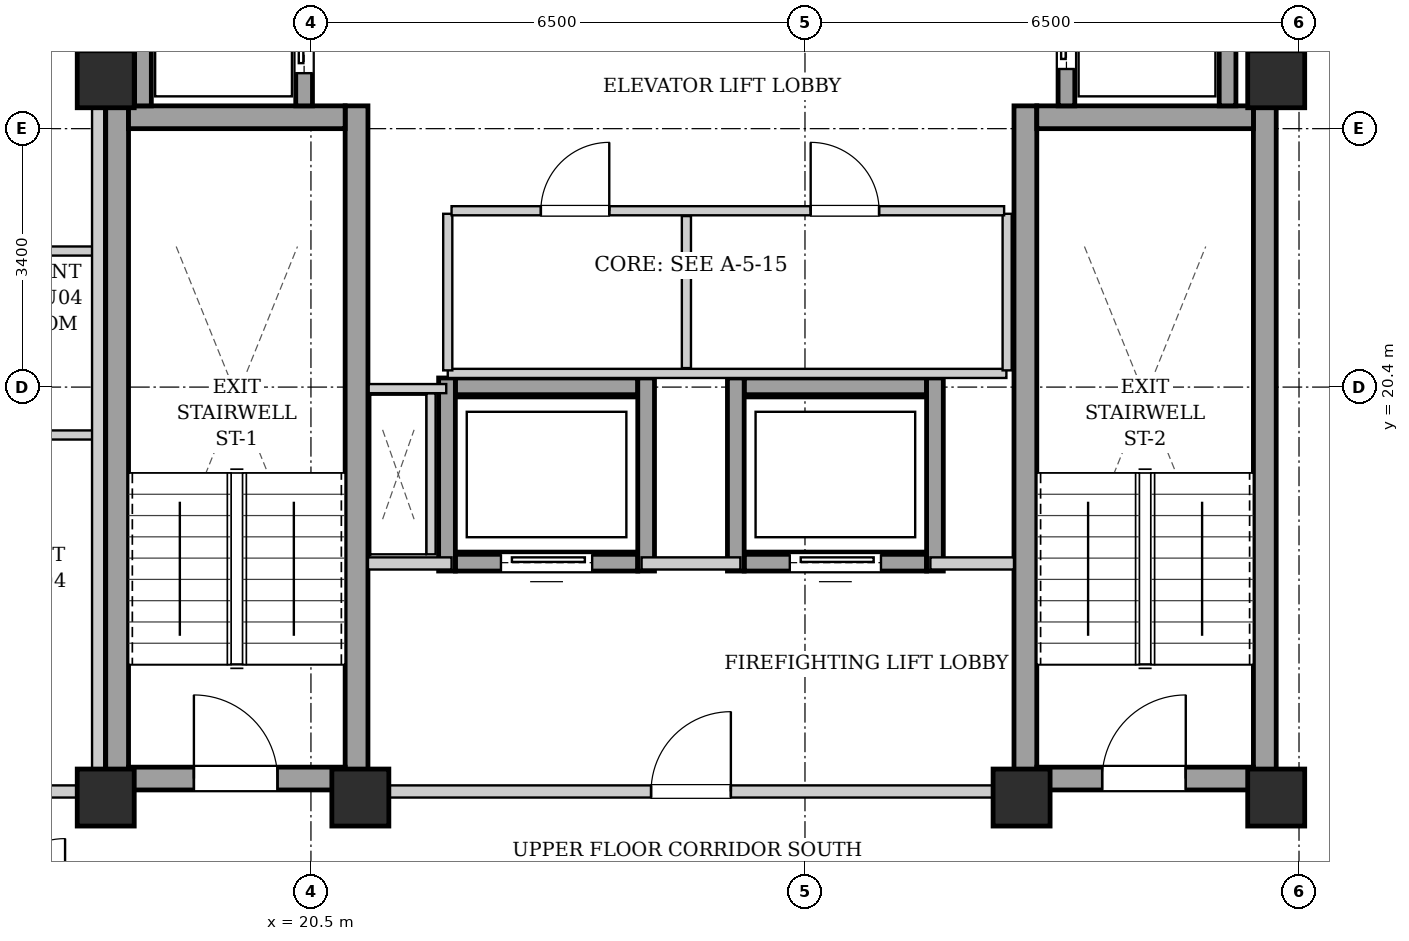
"""IFC4 building model, lengths in metres.
Left out: names, types, materials, properties, quantities, classifications, styles, units other than length and angle.
Written with IfcOpenShell. Run it as: python <this file> out.ifc"""

import sys

from ifc_helpers import new_model, si_unit, direction, frame, frame_2d, origin, origin_2d, place, context, subcontext, project, spatial, rectangle, extrude, element, fill, save


model = new_model("IFC4")
c1 = context("Model", 3, precision=1e-05, world=origin(), true_north=direction((0.0, 1.0)))
c2 = subcontext(c1, "Body", "Model", "MODEL_VIEW")
j1 = project(units=[si_unit("LENGTHUNIT", "METRE"), si_unit("PLANEANGLEUNIT", "RADIAN")], contexts=[c1])
p1 = place(None, origin())
s1 = spatial("IfcSite", under=j1, at=p1, CompositionType="ELEMENT")
p2 = place(p1, origin())
s2 = spatial("IfcBuilding", under=s1, at=p2, CompositionType="ELEMENT")
p3 = place(p2, frame((0.0, 0.0, 230.9)))
s3 = spatial("IfcBuildingStorey", under=s2, at=p3, CompositionType="ELEMENT", Elevation=230.9)
for number, where, z_axis, x_axis in (
    (1, (17.8, 15.0, 0.0), (0.0, 0.0, 1.0), (1.0, 0.0, 0.0)),
    (2, (21.15, 15.0, 0.0), (0.0, 0.0, 1.0), (1.0, 0.0, 0.0)),
    (3, (29.85, 15.0, 0.0), (0.0, 0.0, 1.0), (1.0, 0.0, 0.0)),
    (4, (33.2, 15.0, 0.0), (0.0, 0.0, 1.0), (1.0, 0.0, 0.0)),
    (5, (17.8, 24.45, 0.0), (0.0, 0.0, 1.0), (1.0, 0.0, 0.0)),
    (6, (33.2, 24.45, 0.0), (0.0, 0.0, 1.0), (1.0, 0.0, 0.0)),
):
    element("IfcColumn", number, at=place(p3, frame(where, z_axis=z_axis, x_axis=x_axis)), inside=s3, PredefinedType="COLUMN", context=c2, shape_type="SweptSolid", body=[
        extrude(rectangle(XDim=0.75, YDim=0.75, at=origin_2d()), origin(), (0.0, 0.0, 1.0), 3.4),
    ])
for number, where, z_axis, x_axis in (
    (7, (17.95, 15.1, 0.0), (0.0, 0.0, 1.0), (0.0, 1.0, 0.0)),
    (8, (21.1, 15.1, 0.0), (0.0, 0.0, 1.0), (0.0, 1.0, 0.0)),
):
    element("IfcWall", number, at=place(p3, frame(where, z_axis=z_axis, x_axis=x_axis)), inside=s3, PredefinedType="SHEAR", context=c2, shape_type="SweptSolid", body=[
        extrude(rectangle(XDim=9.0, YDim=0.3, at=frame_2d((4.5, 0.0))), origin(), (0.0, 0.0, 1.0), 3.14),
    ])
p4 = place(p3, frame((18.1, 23.95, 0.0), z_axis=(0.0, 0.0, 1.0), x_axis=(1.0, 0.0, 0.0)))
e9 = element("IfcWall", 9, at=p4, inside=s3, PredefinedType="SHEAR", context=c2, shape_type="SweptSolid", body=[
    extrude(rectangle(XDim=2.85, YDim=0.3, at=frame_2d((1.425, 0.0))), origin(), (0.0, 0.0, 1.0), 3.14),
])
p5 = place(p3, frame((18.1, 15.25, 0.0), z_axis=(0.0, 0.0, 1.0), x_axis=(1.0, 0.0, 0.0)))
e10 = element("IfcWall", 10, at=p5, inside=s3, PredefinedType="SHEAR", context=c2, shape_type="SweptSolid", body=[
    extrude(rectangle(XDim=2.85, YDim=0.3, at=frame_2d((1.425, 0.0))), origin(), (0.0, 0.0, 1.0), 3.14),
])
p6 = place(p5, frame((0.86, 0.0, 0.0)))
e11 = element("IfcOpeningElement", 11, at=p6, cuts=e10, PredefinedType="OPENING", context=c2, shape_type="SweptSolid", body=[
    extrude(rectangle(XDim=1.1, YDim=2.05, at=frame_2d((0.55, 1.025))), frame((0.0, 0.16, 0.0), z_axis=(0.0, -1.0, 0.0), x_axis=(1.0, 0.0, 0.0)), (0.0, 0.0, 1.0), 0.32),
])
for number, where, z_axis, x_axis in (
    (12, (29.9, 15.1, 0.0), (0.0, 0.0, 1.0), (0.0, 1.0, 0.0)),
    (13, (33.05, 15.1, 0.0), (0.0, 0.0, 1.0), (0.0, 1.0, 0.0)),
):
    element("IfcWall", number, at=place(p3, frame(where, z_axis=z_axis, x_axis=x_axis)), inside=s3, PredefinedType="SHEAR", context=c2, shape_type="SweptSolid", body=[
        extrude(rectangle(XDim=9.0, YDim=0.3, at=frame_2d((4.5, 0.0))), origin(), (0.0, 0.0, 1.0), 3.14),
    ])
p7 = place(p3, frame((30.05, 23.95, 0.0), z_axis=(0.0, 0.0, 1.0), x_axis=(1.0, 0.0, 0.0)))
e14 = element("IfcWall", 14, at=p7, inside=s3, PredefinedType="SHEAR", context=c2, shape_type="SweptSolid", body=[
    extrude(rectangle(XDim=2.85, YDim=0.3, at=frame_2d((1.425, 0.0))), origin(), (0.0, 0.0, 1.0), 3.14),
])
p8 = place(p3, frame((30.05, 15.25, 0.0), z_axis=(0.0, 0.0, 1.0), x_axis=(1.0, 0.0, 0.0)))
e15 = element("IfcWall", 15, at=p8, inside=s3, PredefinedType="SHEAR", context=c2, shape_type="SweptSolid", body=[
    extrude(rectangle(XDim=2.85, YDim=0.3, at=frame_2d((1.425, 0.0))), origin(), (0.0, 0.0, 1.0), 3.14),
])
p9 = place(p8, frame((0.86, 0.0, 0.0)))
e16 = element("IfcOpeningElement", 16, at=p9, cuts=e15, PredefinedType="OPENING", context=c2, shape_type="SweptSolid", body=[
    extrude(rectangle(XDim=1.1, YDim=2.05, at=frame_2d((0.55, 1.025))), frame((0.0, 0.16, 0.0), z_axis=(0.0, -1.0, 0.0), x_axis=(1.0, 0.0, 0.0)), (0.0, 0.0, 1.0), 0.32),
])
p10 = place(p3, frame((18.29, 24.1, 0.0), z_axis=(0.0, 0.0, 1.0), x_axis=(0.0, 1.0, 0.0)))
e17 = element("IfcWall", 17, at=p10, inside=s3, PredefinedType="SHEAR", context=c2, shape_type="SweptSolid", body=[
    extrude(rectangle(XDim=4.14, YDim=0.22, at=frame_2d((2.07, 0.0))), origin(), (0.0, 0.0, 1.0), 3.14),
])
p11 = place(p3, frame((20.41, 24.1, 0.0), z_axis=(0.0, 0.0, 1.0), x_axis=(0.0, 1.0, 0.0)))
e18 = element("IfcWall", 18, at=p11, inside=s3, PredefinedType="SHEAR", context=c2, shape_type="SweptSolid", body=[
    extrude(rectangle(XDim=1.96, YDim=0.22, at=frame_2d((0.98, 0.0))), origin(), (0.0, 0.0, 1.0), 3.14),
])
p12 = place(p11, frame((0.43, 0.0, 0.0)))
e19 = element("IfcOpeningElement", 19, at=p12, cuts=e18, PredefinedType="OPENING", context=c2, shape_type="SweptSolid", body=[
    extrude(rectangle(XDim=1.1, YDim=2.15, at=frame_2d((0.55, 1.075))), frame((0.0, 0.12, 0.0), z_axis=(0.0, -1.0, 0.0), x_axis=(1.0, 0.0, 0.0)), (0.0, 0.0, 1.0), 0.24),
])
p13 = place(p3, frame((30.44, 24.1, 0.0), z_axis=(0.0, 0.0, 1.0), x_axis=(0.0, 1.0, 0.0)))
e20 = element("IfcWall", 20, at=p13, inside=s3, PredefinedType="SHEAR", context=c2, shape_type="SweptSolid", body=[
    extrude(rectangle(XDim=2.07, YDim=0.22, at=frame_2d((1.035, 0.0))), origin(), (0.0, 0.0, 1.0), 3.14),
])
p14 = place(p13, frame((0.485, 0.0, 0.0)))
e21 = element("IfcOpeningElement", 21, at=p14, cuts=e20, PredefinedType="OPENING", context=c2, shape_type="SweptSolid", body=[
    extrude(rectangle(XDim=1.1, YDim=2.15, at=frame_2d((0.55, 1.075))), frame((0.0, 0.12, 0.0), z_axis=(0.0, -1.0, 0.0), x_axis=(1.0, 0.0, 0.0)), (0.0, 0.0, 1.0), 0.24),
])
p15 = place(p3, frame((32.56, 24.1, 0.0), z_axis=(0.0, 0.0, 1.0), x_axis=(0.0, 1.0, 0.0)))
e22 = element("IfcWall", 22, at=p15, inside=s3, PredefinedType="SHEAR", context=c2, shape_type="SweptSolid", body=[
    extrude(rectangle(XDim=2.07, YDim=0.22, at=frame_2d((1.035, 0.0))), origin(), (0.0, 0.0, 1.0), 3.14),
])
p16 = place(p3, frame((22.4, 18.09, 0.0), z_axis=(0.0, 0.0, 1.0), x_axis=(1.0, 0.0, 0.0)))
e23 = element("IfcWall", 23, at=p16, inside=s3, PredefinedType="SHEAR", context=c2, shape_type="SweptSolid", body=[
    extrude(rectangle(XDim=2.4, YDim=0.22, at=frame_2d((1.2, 0.0))), origin(), (0.0, 0.0, 1.0), 3.14),
])
p17 = place(p16, frame((0.6, 0.0, 0.0)))
e24 = element("IfcOpeningElement", 24, at=p17, cuts=e23, PredefinedType="OPENING", context=c2, shape_type="SweptSolid", body=[
    extrude(rectangle(XDim=1.2, YDim=2.15, at=frame_2d((0.6, 1.075))), frame((0.0, 0.12, 0.0), z_axis=(0.0, -1.0, 0.0), x_axis=(1.0, 0.0, 0.0)), (0.0, 0.0, 1.0), 0.24),
])
p18 = place(p3, frame((22.4, 20.41, 0.0), z_axis=(0.0, 0.0, 1.0), x_axis=(1.0, 0.0, 0.0)))
e25 = element("IfcWall", 25, at=p18, inside=s3, PredefinedType="SHEAR", context=c2, shape_type="SweptSolid", body=[
    extrude(rectangle(XDim=2.4, YDim=0.22, at=frame_2d((1.2, 0.0))), origin(), (0.0, 0.0, 1.0), 3.14),
])
for number, where, z_axis, x_axis in (
    (26, (22.29, 17.98, 0.0), (0.0, 0.0, 1.0), (0.0, 1.0, 0.0)),
    (27, (24.91, 17.98, 0.0), (0.0, 0.0, 1.0), (0.0, 1.0, 0.0)),
):
    element("IfcWall", number, at=place(p3, frame(where, z_axis=z_axis, x_axis=x_axis)), inside=s3, PredefinedType="SHEAR", context=c2, shape_type="SweptSolid", body=[
        extrude(rectangle(XDim=2.54, YDim=0.22, at=frame_2d((1.27, 0.0))), origin(), (0.0, 0.0, 1.0), 3.14),
    ])
p19 = place(p3, frame((26.2, 18.09, 0.0), z_axis=(0.0, 0.0, 1.0), x_axis=(1.0, 0.0, 0.0)))
e28 = element("IfcWall", 28, at=p19, inside=s3, PredefinedType="SHEAR", context=c2, shape_type="SweptSolid", body=[
    extrude(rectangle(XDim=2.4, YDim=0.22, at=frame_2d((1.2, 0.0))), origin(), (0.0, 0.0, 1.0), 3.14),
])
p20 = place(p19, frame((0.6, 0.0, 0.0)))
e29 = element("IfcOpeningElement", 29, at=p20, cuts=e28, PredefinedType="OPENING", context=c2, shape_type="SweptSolid", body=[
    extrude(rectangle(XDim=1.2, YDim=2.15, at=frame_2d((0.6, 1.075))), frame((0.0, 0.12, 0.0), z_axis=(0.0, -1.0, 0.0), x_axis=(1.0, 0.0, 0.0)), (0.0, 0.0, 1.0), 0.24),
])
p21 = place(p3, frame((26.2, 20.41, 0.0), z_axis=(0.0, 0.0, 1.0), x_axis=(1.0, 0.0, 0.0)))
e30 = element("IfcWall", 30, at=p21, inside=s3, PredefinedType="SHEAR", context=c2, shape_type="SweptSolid", body=[
    extrude(rectangle(XDim=2.4, YDim=0.22, at=frame_2d((1.2, 0.0))), origin(), (0.0, 0.0, 1.0), 3.14),
])
for number, where, z_axis, x_axis in (
    (31, (26.09, 17.98, 0.0), (0.0, 0.0, 1.0), (0.0, 1.0, 0.0)),
    (32, (28.71, 17.98, 0.0), (0.0, 0.0, 1.0), (0.0, 1.0, 0.0)),
):
    element("IfcWall", number, at=place(p3, frame(where, z_axis=z_axis, x_axis=x_axis)), inside=s3, PredefinedType="SHEAR", context=c2, shape_type="SweptSolid", body=[
        extrude(rectangle(XDim=2.54, YDim=0.22, at=frame_2d((1.27, 0.0))), origin(), (0.0, 0.0, 1.0), 3.14),
    ])
p22 = place(p3, frame((21.25, 15.08, 0.0), z_axis=(0.0, 0.0, 1.0), x_axis=(1.0, 0.0, 0.0)))
e33 = element("IfcWall", 33, at=p22, inside=s3, PredefinedType="PARTITIONING", context=c2, shape_type="SweptSolid", body=[
    extrude(rectangle(XDim=8.5, YDim=0.16, at=frame_2d((4.25, 0.0))), origin(), (0.0, 0.0, 1.0), 2.668),
])
p23 = place(p22, frame((3.725, 0.0, 0.0)))
e34 = element("IfcOpeningElement", 34, at=p23, cuts=e33, PredefinedType="OPENING", context=c2, shape_type="SweptSolid", body=[
    extrude(rectangle(XDim=1.05, YDim=2.05, at=frame_2d((0.525, 1.025))), frame((0.0, 0.09, 0.0), z_axis=(0.0, -1.0, 0.0), x_axis=(1.0, 0.0, 0.0)), (0.0, 0.0, 1.0), 0.18),
])
p24 = place(p3, frame((21.25, 18.08, 0.0), z_axis=(0.0, 0.0, 1.0), x_axis=(1.0, 0.0, 0.0)))
e35 = element("IfcWall", 35, at=p24, inside=s3, PredefinedType="PARTITIONING", context=c2, shape_type="SweptSolid", body=[
    extrude(rectangle(XDim=1.1, YDim=0.16, at=frame_2d((0.55, 0.0))), origin(), (0.0, 0.0, 1.0), 3.14),
])
p25 = place(p3, frame((24.85, 18.08, 0.0), z_axis=(0.0, 0.0, 1.0), x_axis=(1.0, 0.0, 0.0)))
e36 = element("IfcWall", 36, at=p25, inside=s3, PredefinedType="PARTITIONING", context=c2, shape_type="SweptSolid", body=[
    extrude(rectangle(XDim=1.3, YDim=0.16, at=frame_2d((0.65, 0.0))), origin(), (0.0, 0.0, 1.0), 3.14),
])
p26 = place(p3, frame((28.65, 18.08, 0.0), z_axis=(0.0, 0.0, 1.0), x_axis=(1.0, 0.0, 0.0)))
e37 = element("IfcWall", 37, at=p26, inside=s3, PredefinedType="PARTITIONING", context=c2, shape_type="SweptSolid", body=[
    extrude(rectangle(XDim=1.1, YDim=0.16, at=frame_2d((0.55, 0.0))), origin(), (0.0, 0.0, 1.0), 3.14),
])
for number, where, z_axis, x_axis in (
    (38, (17.88, 24.12, 0.0), (0.0, 0.0, 1.0), (0.0, 1.0, 0.0)),
    (39, (33.12, 24.12, 0.0), (0.0, 0.0, 1.0), (0.0, 1.0, 0.0)),
):
    element("IfcWall", number, at=place(p3, frame(where, z_axis=z_axis, x_axis=x_axis)), inside=s3, PredefinedType="PARTITIONING", context=c2, shape_type="SweptSolid", body=[
        extrude(rectangle(XDim=4.76, YDim=0.16, at=frame_2d((2.38, 0.0))), origin(), (0.0, 0.0, 1.0), 3.14),
    ])
p27 = place(p3, frame((22.08, 18.2, 0.0), z_axis=(0.0, 0.0, 1.0), x_axis=(0.0, 1.0, 0.0)))
e40 = element("IfcWall", 40, at=p27, inside=s3, PredefinedType="PARTITIONING", context=c2, shape_type="SweptSolid", body=[
    extrude(rectangle(XDim=2.12, YDim=0.12, at=frame_2d((1.06, 0.0))), origin(), (0.0, 0.0, 1.0), 3.14),
])
p28 = place(p3, frame((22.28, 20.38, 0.0), z_axis=(0.0, 0.0, 1.0), x_axis=(-1.0, 0.0, 0.0)))
e41 = element("IfcWall", 41, at=p28, inside=s3, PredefinedType="PARTITIONING", context=c2, shape_type="SweptSolid", body=[
    extrude(rectangle(XDim=1.02, YDim=0.12, at=frame_2d((0.51, 0.0))), origin(), (0.0, 0.0, 1.0), 3.14),
])
p29 = place(p3, frame((22.3, 20.58, 0.0), z_axis=(0.0, 0.0, 1.0), x_axis=(1.0, 0.0, 0.0)))
e42 = element("IfcWall", 42, at=p29, inside=s3, PredefinedType="PARTITIONING", context=c2, shape_type="SweptSolid", body=[
    extrude(rectangle(XDim=7.35, YDim=0.12, at=frame_2d((3.675, 0.0))), origin(), (0.0, 0.0, 1.0), 3.14),
])
for number, where, z_axis, x_axis in (
    (43, (22.3, 20.62, 0.0), (0.0, 0.0, 1.0), (0.0, 1.0, 0.0)),
    (44, (29.66, 20.62, 0.0), (0.0, 0.0, 1.0), (0.0, 1.0, 0.0)),
):
    element("IfcWall", number, at=place(p3, frame(where, z_axis=z_axis, x_axis=x_axis)), inside=s3, PredefinedType="PARTITIONING", context=c2, shape_type="SweptSolid", body=[
        extrude(rectangle(XDim=2.06, YDim=0.12, at=frame_2d((1.03, 0.0))), origin(), (0.0, 0.0, 1.0), 3.14),
    ])
p30 = place(p3, frame((25.44, 20.65, 0.0), z_axis=(0.0, 0.0, 1.0), x_axis=(0.0, 1.0, 0.0)))
e45 = element("IfcWall", 45, at=p30, inside=s3, PredefinedType="PARTITIONING", context=c2, shape_type="SweptSolid", body=[
    extrude(rectangle(XDim=2.0, YDim=0.12, at=frame_2d((1.0, 0.0))), origin(), (0.0, 0.0, 1.0), 3.14),
])
p31 = place(p3, frame((22.35, 22.72, 0.0), z_axis=(0.0, 0.0, 1.0), x_axis=(1.0, 0.0, 0.0)))
e46 = element("IfcWall", 46, at=p31, inside=s3, PredefinedType="PARTITIONING", context=c2, shape_type="SweptSolid", body=[
    extrude(rectangle(XDim=7.27, YDim=0.12, at=frame_2d((3.635, 0.0))), origin(), (0.0, 0.0, 1.0), 3.14),
])
p32 = place(p31, frame((1.175, 0.0, 0.0)))
e47 = element("IfcOpeningElement", 47, at=p32, cuts=e46, PredefinedType="OPENING", context=c2, shape_type="SweptSolid", body=[
    extrude(rectangle(XDim=0.9, YDim=2.05, at=frame_2d((0.45, 1.025))), frame((0.0, 0.07, 0.0), z_axis=(0.0, -1.0, 0.0), x_axis=(1.0, 0.0, 0.0)), (0.0, 0.0, 1.0), 0.14),
])
p33 = place(p31, frame((4.725, 0.0, 0.0)))
e48 = element("IfcOpeningElement", 48, at=p33, cuts=e46, PredefinedType="OPENING", context=c2, shape_type="SweptSolid", body=[
    extrude(rectangle(XDim=0.9, YDim=2.05, at=frame_2d((0.45, 1.025))), frame((0.0, 0.07, 0.0), z_axis=(0.0, -1.0, 0.0), x_axis=(1.0, 0.0, 0.0)), (0.0, 0.0, 1.0), 0.14),
])
p34 = place(p3, frame((10.88, 15.08, 0.0), z_axis=(0.0, 0.0, 1.0), x_axis=(1.0, 0.0, 0.0)))
e49 = element("IfcWall", 49, at=p34, inside=s3, PredefinedType="PARTITIONING", context=c2, shape_type="SweptSolid", body=[
    extrude(rectangle(XDim=6.88, YDim=0.16, at=frame_2d((3.44, 0.0))), origin(), (0.0, 0.0, 1.0), 2.668),
])
p35 = place(p34, frame((5.06, 0.0, 0.0)))
e50 = element("IfcOpeningElement", 50, at=p35, cuts=e49, PredefinedType="OPENING", context=c2, shape_type="SweptSolid", body=[
    extrude(rectangle(XDim=0.95, YDim=2.1, at=frame_2d((0.475, 1.05))), frame((0.0, 0.09, 0.0), z_axis=(0.0, -1.0, 0.0), x_axis=(1.0, 0.0, 0.0)), (0.0, 0.0, 1.0), 0.18),
])
p36 = place(p3, frame((15.19, 22.19, 0.0), z_axis=(0.0, 0.0, 1.0), x_axis=(1.0, 0.0, 0.0)))
e51 = element("IfcWall", 51, at=p36, inside=s3, PredefinedType="PARTITIONING", context=c2, shape_type="SweptSolid", body=[
    extrude(rectangle(XDim=2.45, YDim=0.12, at=frame_2d((1.225, 0.0))), origin(), (0.0, 0.0, 1.0), 3.14),
])
p37 = place(p3, frame((15.19, 19.77, 0.0), z_axis=(0.0, 0.0, 1.0), x_axis=(1.0, 0.0, 0.0)))
e52 = element("IfcWall", 52, at=p37, inside=s3, PredefinedType="PARTITIONING", context=c2, shape_type="SweptSolid", body=[
    extrude(rectangle(XDim=2.45, YDim=0.12, at=frame_2d((1.225, 0.0))), origin(), (0.0, 0.0, 1.0), 3.14),
])
p38 = place(p37, frame((0.795, 0.0, 0.0)))
e53 = element("IfcOpeningElement", 53, at=p38, cuts=e52, PredefinedType="OPENING", context=c2, shape_type="SweptSolid", body=[
    extrude(rectangle(XDim=0.86, YDim=2.05, at=frame_2d((0.43, 1.025))), frame((0.0, 0.07, 0.0), z_axis=(0.0, -1.0, 0.0), x_axis=(1.0, 0.0, 0.0)), (0.0, 0.0, 1.0), 0.14),
])
p39 = place(p3, frame((17.7, 15.02, 0.0), z_axis=(0.0, 0.0, 1.0), x_axis=(0.0, 1.0, 0.0)))
e54 = element("IfcWall", 54, at=p39, inside=s3, PredefinedType="PARTITIONING", context=c2, shape_type="SweptSolid", body=[
    extrude(rectangle(XDim=13.98, YDim=0.16, at=frame_2d((6.99, 0.0))), origin(), (0.0, 0.0, 1.0), 3.14),
])
p40 = place(p6, origin())
e55 = element("IfcDoor", 55, at=p40, inside=s3, OperationType="SINGLE_SWING_LEFT", PredefinedType="DOOR", context=c2, shape_type="SweptSolid", body=[
    extrude(rectangle(XDim=1.1, YDim=2.05, at=frame_2d((0.55, 1.025))), frame((0.0, 0.025, 0.0), z_axis=(0.0, -1.0, 0.0), x_axis=(1.0, 0.0, 0.0)), (0.0, 0.0, 1.0), 0.05),
])
fill(e11, e55)
p41 = place(p9, origin())
e56 = element("IfcDoor", 56, at=p41, inside=s3, OperationType="SINGLE_SWING_RIGHT", PredefinedType="DOOR", context=c2, shape_type="SweptSolid", body=[
    extrude(rectangle(XDim=1.1, YDim=2.05, at=frame_2d((0.55, 1.025))), frame((0.0, 0.025, 0.0), z_axis=(0.0, -1.0, 0.0), x_axis=(1.0, 0.0, 0.0)), (0.0, 0.0, 1.0), 0.05),
])
fill(e16, e56)
p42 = place(p12, origin())
e57 = element("IfcDoor", 57, at=p42, inside=s3, OperationType="SLIDING_TO_LEFT", PredefinedType="DOOR", context=c2, shape_type="SweptSolid", body=[
    extrude(rectangle(XDim=1.1, YDim=2.15, at=frame_2d((0.55, 1.075))), frame((0.0, 0.025, 0.0), z_axis=(0.0, -1.0, 0.0), x_axis=(1.0, 0.0, 0.0)), (0.0, 0.0, 1.0), 0.05),
])
fill(e19, e57)
p43 = place(p14, origin())
e58 = element("IfcDoor", 58, at=p43, inside=s3, OperationType="SLIDING_TO_LEFT", PredefinedType="DOOR", context=c2, shape_type="SweptSolid", body=[
    extrude(rectangle(XDim=1.1, YDim=2.15, at=frame_2d((0.55, 1.075))), frame((0.0, 0.025, 0.0), z_axis=(0.0, -1.0, 0.0), x_axis=(1.0, 0.0, 0.0)), (0.0, 0.0, 1.0), 0.05),
])
fill(e21, e58)
p44 = place(p17, origin())
e59 = element("IfcDoor", 59, at=p44, inside=s3, OperationType="SLIDING_TO_LEFT", PredefinedType="DOOR", context=c2, shape_type="SweptSolid", body=[
    extrude(rectangle(XDim=1.2, YDim=2.15, at=frame_2d((0.6, 1.075))), frame((0.0, 0.025, 0.0), z_axis=(0.0, -1.0, 0.0), x_axis=(1.0, 0.0, 0.0)), (0.0, 0.0, 1.0), 0.05),
])
fill(e24, e59)
p45 = place(p20, origin())
e60 = element("IfcDoor", 60, at=p45, inside=s3, OperationType="SLIDING_TO_LEFT", PredefinedType="DOOR", context=c2, shape_type="SweptSolid", body=[
    extrude(rectangle(XDim=1.2, YDim=2.15, at=frame_2d((0.6, 1.075))), frame((0.0, 0.025, 0.0), z_axis=(0.0, -1.0, 0.0), x_axis=(1.0, 0.0, 0.0)), (0.0, 0.0, 1.0), 0.05),
])
fill(e29, e60)
p46 = place(p23, origin())
e61 = element("IfcDoor", 61, at=p46, inside=s3, OperationType="SINGLE_SWING_RIGHT", PredefinedType="DOOR", context=c2, shape_type="SweptSolid", body=[
    extrude(rectangle(XDim=1.05, YDim=2.05, at=frame_2d((0.525, 1.025))), frame((0.0, 0.025, 0.0), z_axis=(0.0, -1.0, 0.0), x_axis=(1.0, 0.0, 0.0)), (0.0, 0.0, 1.0), 0.05),
])
fill(e34, e61)
p47 = place(p32, origin())
e62 = element("IfcDoor", 62, at=p47, inside=s3, OperationType="SINGLE_SWING_RIGHT", PredefinedType="DOOR", context=c2, shape_type="SweptSolid", body=[
    extrude(rectangle(XDim=0.9, YDim=2.05, at=frame_2d((0.45, 1.025))), frame((0.0, 0.025, 0.0), z_axis=(0.0, -1.0, 0.0), x_axis=(1.0, 0.0, 0.0)), (0.0, 0.0, 1.0), 0.05),
])
fill(e47, e62)
p48 = place(p33, origin())
e63 = element("IfcDoor", 63, at=p48, inside=s3, OperationType="SINGLE_SWING_LEFT", PredefinedType="DOOR", context=c2, shape_type="SweptSolid", body=[
    extrude(rectangle(XDim=0.9, YDim=2.05, at=frame_2d((0.45, 1.025))), frame((0.0, 0.025, 0.0), z_axis=(0.0, -1.0, 0.0), x_axis=(1.0, 0.0, 0.0)), (0.0, 0.0, 1.0), 0.05),
])
fill(e48, e63)
save(model, sys.argv[1])
